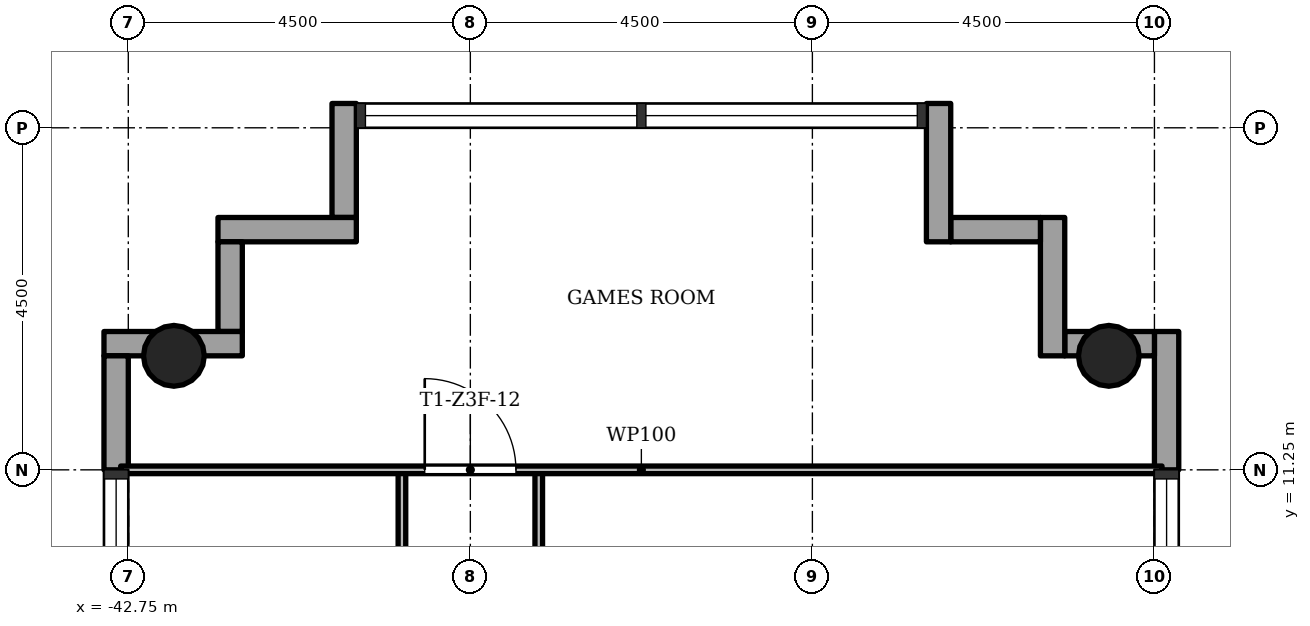
"""IFC4 building model, lengths in metres.
Left out: names, types, materials, properties, quantities, classifications, styles, units other than length and angle.
Written with IfcOpenShell. Run it as: python <this file> out.ifc"""

import sys

from ifc_helpers import new_model, si_unit, direction, frame, frame_2d, origin, origin_2d, place, context, subcontext, project, spatial, rectangle, hollow_circle, extrude, element, fill, save


model = new_model("IFC4")
c1 = context("Model", 3, precision=1e-05, world=origin(), true_north=direction((0.0, 1.0)))
c2 = subcontext(c1, "Body", "Model", "MODEL_VIEW")
j1 = project(units=[si_unit("LENGTHUNIT", "METRE"), si_unit("PLANEANGLEUNIT", "RADIAN")], contexts=[c1])
p1 = place(None, origin())
s1 = spatial("IfcSite", under=j1, at=p1, CompositionType="ELEMENT")
p2 = place(p1, origin())
s2 = spatial("IfcBuilding", under=s1, at=p2, CompositionType="ELEMENT")
p3 = place(p2, frame((0.0, 0.0, 171.1)))
s3 = spatial("IfcBuildingStorey", under=s2, at=p3, CompositionType="ELEMENT", Elevation=171.1)
for number, where, z_axis, x_axis in (
    (1, (-29.85, 12.75, 0.0), (0.0, 0.0, 1.0), (1.0, 0.0, 0.0)),
    (2, (-42.15, 12.75, 0.0), (0.0, 0.0, 1.0), (1.0, 0.0, 0.0)),
):
    element("IfcColumn", number, at=place(p3, frame(where, z_axis=z_axis, x_axis=x_axis)), inside=s3, PredefinedType="COLUMN", context=c2, shape_type="SweptSolid", body=[
        extrude(hollow_circle(Radius=0.4, WallThickness=0.028, at=origin_2d()), origin(), (0.0, 0.0, 1.0), 3.4),
    ])
p4 = place(p3, frame((-29.09, 11.25, -0.3), z_axis=(0.0, 0.0, 1.0), x_axis=(0.0, 1.0, 0.0)))
e3 = element("IfcWall", 3, at=p4, inside=s3, PredefinedType="STANDARD", context=c2, shape_type="SweptSolid", body=[
    extrude(rectangle(XDim=1.82, YDim=0.32, at=frame_2d((0.91, 0.0))), origin(), (0.0, 0.0, 1.0), 3.4),
])
p5 = place(p3, frame((-29.25, 12.91, -0.3), z_axis=(0.0, 0.0, 1.0), x_axis=(-1.0, 0.0, 0.0)))
e4 = element("IfcWall", 4, at=p5, inside=s3, PredefinedType="STANDARD", context=c2, shape_type="SweptSolid", body=[
    extrude(rectangle(XDim=1.18, YDim=0.32, at=frame_2d((0.59, 0.0))), origin(), (0.0, 0.0, 1.0), 3.4),
])
p6 = place(p3, frame((-30.59, 12.75, -0.3), z_axis=(0.0, 0.0, 1.0), x_axis=(0.0, 1.0, 0.0)))
e5 = element("IfcWall", 5, at=p6, inside=s3, PredefinedType="STANDARD", context=c2, shape_type="SweptSolid", body=[
    extrude(rectangle(XDim=1.82, YDim=0.32, at=frame_2d((0.91, 0.0))), origin(), (0.0, 0.0, 1.0), 3.4),
])
p7 = place(p3, frame((-30.75, 14.41, -0.3), z_axis=(0.0, 0.0, 1.0), x_axis=(-1.0, 0.0, 0.0)))
e6 = element("IfcWall", 6, at=p7, inside=s3, PredefinedType="STANDARD", context=c2, shape_type="SweptSolid", body=[
    extrude(rectangle(XDim=1.18, YDim=0.32, at=frame_2d((0.59, 0.0))), origin(), (0.0, 0.0, 1.0), 3.4),
])
p8 = place(p3, frame((-32.09, 14.25, -0.3), z_axis=(0.0, 0.0, 1.0), x_axis=(0.0, 1.0, 0.0)))
e7 = element("IfcWall", 7, at=p8, inside=s3, PredefinedType="STANDARD", context=c2, shape_type="SweptSolid", body=[
    extrude(rectangle(XDim=1.82, YDim=0.32, at=frame_2d((0.91, 0.0))), origin(), (0.0, 0.0, 1.0), 3.4),
])
p9 = place(p3, frame((-39.91, 16.07, -0.3), z_axis=(0.0, 0.0, 1.0), x_axis=(0.0, -1.0, 0.0)))
e8 = element("IfcWall", 8, at=p9, inside=s3, PredefinedType="STANDARD", context=c2, shape_type="SweptSolid", body=[
    extrude(rectangle(XDim=1.5, YDim=0.32, at=frame_2d((0.75, 0.0))), origin(), (0.0, 0.0, 1.0), 3.4),
])
p10 = place(p3, frame((-39.75, 14.41, -0.3), z_axis=(0.0, 0.0, 1.0), x_axis=(-1.0, 0.0, 0.0)))
e9 = element("IfcWall", 9, at=p10, inside=s3, PredefinedType="STANDARD", context=c2, shape_type="SweptSolid", body=[
    extrude(rectangle(XDim=1.82, YDim=0.32, at=frame_2d((0.91, 0.0))), origin(), (0.0, 0.0, 1.0), 3.4),
])
p11 = place(p3, frame((-41.41, 14.25, -0.3), z_axis=(0.0, 0.0, 1.0), x_axis=(0.0, -1.0, 0.0)))
e10 = element("IfcWall", 10, at=p11, inside=s3, PredefinedType="STANDARD", context=c2, shape_type="SweptSolid", body=[
    extrude(rectangle(XDim=1.18, YDim=0.32, at=frame_2d((0.59, 0.0))), origin(), (0.0, 0.0, 1.0), 3.4),
])
p12 = place(p3, frame((-41.25, 12.91, -0.3), z_axis=(0.0, 0.0, 1.0), x_axis=(-1.0, 0.0, 0.0)))
e11 = element("IfcWall", 11, at=p12, inside=s3, PredefinedType="STANDARD", context=c2, shape_type="SweptSolid", body=[
    extrude(rectangle(XDim=1.82, YDim=0.32, at=frame_2d((0.91, 0.0))), origin(), (0.0, 0.0, 1.0), 3.4),
])
p13 = place(p3, frame((-42.91, 12.75, -0.3), z_axis=(0.0, 0.0, 1.0), x_axis=(0.0, -1.0, 0.0)))
e12 = element("IfcWall", 12, at=p13, inside=s3, PredefinedType="STANDARD", context=c2, shape_type="SweptSolid", body=[
    extrude(rectangle(XDim=1.5, YDim=0.32, at=frame_2d((0.75, 0.0))), origin(), (0.0, 0.0, 1.0), 3.4),
])
p14 = place(p3, frame((-39.15, 6.75, 0.0), z_axis=(0.0, 0.0, 1.0), x_axis=(0.0, 1.0, 0.0)))
e13 = element("IfcWall", 13, at=p14, inside=s3, PredefinedType="PARTITIONING", context=c2, shape_type="SweptSolid", body=[
    extrude(rectangle(XDim=4.5, YDim=0.1, at=frame_2d((2.25, 0.0))), origin(), (0.0, 0.0, 1.0), 3.0),
])
p15 = place(p14, frame((1.8, 0.0, 0.0)))
e14 = element("IfcOpeningElement", 14, at=p15, cuts=e13, PredefinedType="OPENING", context=c2, shape_type="SweptSolid", body=[
    extrude(rectangle(XDim=0.9, YDim=2.1, at=frame_2d((0.45, 1.05))), frame((0.0, 0.06, 0.0), z_axis=(0.0, -1.0, 0.0), x_axis=(1.0, 0.0, 0.0)), (0.0, 0.0, 1.0), 0.12),
])
p16 = place(p3, frame((-37.35, 8.55, 0.0), z_axis=(0.0, 0.0, 1.0), x_axis=(0.0, 1.0, 0.0)))
e15 = element("IfcWall", 15, at=p16, inside=s3, PredefinedType="PARTITIONING", context=c2, shape_type="SweptSolid", body=[
    extrude(rectangle(XDim=2.7, YDim=0.1, at=frame_2d((1.35, 0.0))), origin(), (0.0, 0.0, 1.0), 3.0),
])
p17 = place(p16, frame((0.07, 0.0, 0.0)))
e16 = element("IfcOpeningElement", 16, at=p17, cuts=e15, PredefinedType="OPENING", context=c2, shape_type="SweptSolid", body=[
    extrude(rectangle(XDim=0.9, YDim=2.1, at=frame_2d((0.45, 1.05))), frame((0.0, 0.06, 0.0), z_axis=(0.0, -1.0, 0.0), x_axis=(1.0, 0.0, 0.0)), (0.0, 0.0, 1.0), 0.12),
])
p18 = place(p3, frame((-42.85, 11.25, 0.0), z_axis=(0.0, 0.0, 1.0), x_axis=(1.0, 0.0, 0.0)))
e17 = element("IfcWall", 17, at=p18, inside=s3, PredefinedType="PARTITIONING", context=c2, shape_type="SweptSolid", body=[
    extrude(rectangle(XDim=13.7, YDim=0.1, at=frame_2d((6.85, 0.0))), origin(), (0.0, 0.0, 1.0), 3.0),
])
p19 = place(p18, frame((4.0, 0.0, 0.0)))
e18 = element("IfcOpeningElement", 18, at=p19, cuts=e17, PredefinedType="OPENING", context=c2, shape_type="SweptSolid", body=[
    extrude(rectangle(XDim=1.2, YDim=2.1, at=frame_2d((0.6, 1.05))), frame((0.0, 0.06, 0.0), z_axis=(0.0, -1.0, 0.0), x_axis=(1.0, 0.0, 0.0)), (0.0, 0.0, 1.0), 0.12),
])
p20 = place(p19, origin())
e19 = element("IfcDoor", 19, at=p20, inside=s3, OperationType="SINGLE_SWING_RIGHT", PredefinedType="DOOR", context=c2, shape_type="SweptSolid", body=[
    extrude(rectangle(XDim=1.2, YDim=2.1, at=frame_2d((0.6, 1.05))), frame((0.0, 0.025, 0.0), z_axis=(0.0, -1.0, 0.0), x_axis=(1.0, 0.0, 0.0)), (0.0, 0.0, 1.0), 0.05),
])
fill(e18, e19)
save(model, sys.argv[1])
